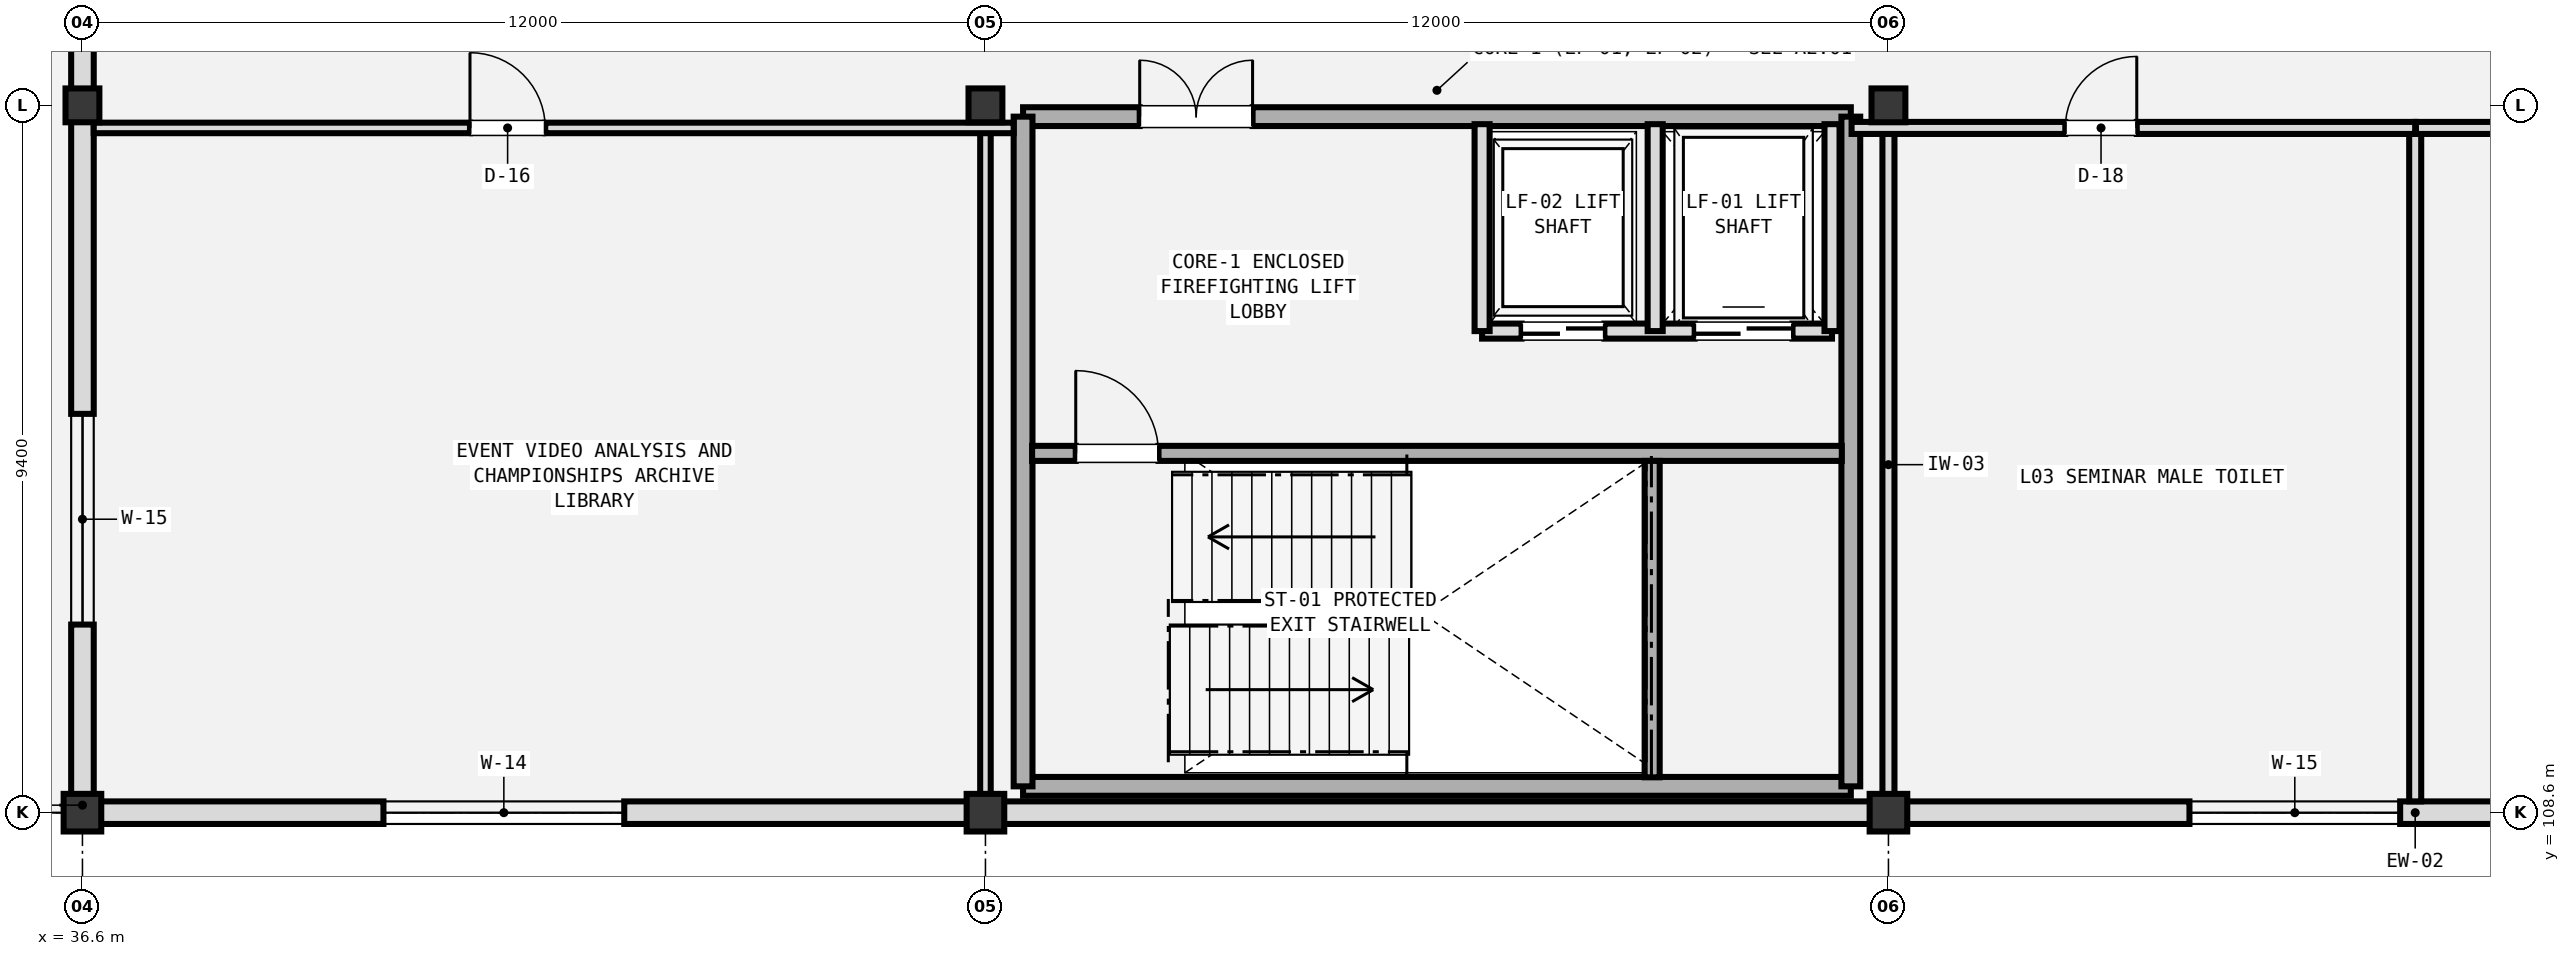
"""IFC4 building model, lengths in metres.
Left out: names, types, materials, properties, quantities, classifications, styles, units other than length and angle.
Written with IfcOpenShell. Run it as: python <this file> out.ifc"""

import sys

from ifc_helpers import new_model, si_unit, direction, frame, frame_2d, origin, origin_2d, place, context, subcontext, project, spatial, rectangle, extrude, element, fill, save


model = new_model("IFC4")
c1 = context("Model", 3, precision=1e-05, world=origin(), true_north=direction((0.0, 1.0)))
c2 = subcontext(c1, "Body", "Model", "MODEL_VIEW")
j1 = project(units=[si_unit("LENGTHUNIT", "METRE"), si_unit("PLANEANGLEUNIT", "RADIAN")], contexts=[c1])
p1 = place(None, origin())
s1 = spatial("IfcSite", under=j1, at=p1, CompositionType="ELEMENT")
p2 = place(p1, origin())
s2 = spatial("IfcBuilding", under=s1, at=p2, CompositionType="ELEMENT")
p3 = place(p2, frame((0.0, 0.0, 14.4)))
s3 = spatial("IfcBuildingStorey", under=s2, at=p3, CompositionType="ELEMENT", Elevation=14.4)
p4 = place(p3, frame((36.6, 108.6, 0.0), z_axis=(0.0, 0.0, 1.0), x_axis=(1.0, 0.0, 0.0)))
e1 = element("IfcColumn", 1, at=p4, inside=s3, PredefinedType="COLUMN", context=c2, shape_type="SweptSolid", body=[
    extrude(rectangle(XDim=0.5, YDim=0.5, at=origin_2d()), origin(), (0.0, 0.0, 1.0), 3.86),
])
p5 = place(p3, frame((36.6, 118.0, 0.0), z_axis=(0.0, 0.0, 1.0), x_axis=(1.0, 0.0, 0.0)))
e2 = element("IfcColumn", 2, at=p5, inside=s3, PredefinedType="COLUMN", context=c2, shape_type="SweptSolid", body=[
    extrude(rectangle(XDim=0.45, YDim=0.45, at=origin_2d()), origin(), (0.0, 0.0, 1.0), 3.86),
])
p6 = place(p3, frame((48.6, 108.6, 0.0), z_axis=(0.0, 0.0, 1.0), x_axis=(1.0, 0.0, 0.0)))
e3 = element("IfcColumn", 3, at=p6, inside=s3, PredefinedType="COLUMN", context=c2, shape_type="SweptSolid", body=[
    extrude(rectangle(XDim=0.5, YDim=0.5, at=origin_2d()), origin(), (0.0, 0.0, 1.0), 4.2),
])
p7 = place(p3, frame((48.6, 118.0, 0.0), z_axis=(0.0, 0.0, 1.0), x_axis=(1.0, 0.0, 0.0)))
e4 = element("IfcColumn", 4, at=p7, inside=s3, PredefinedType="COLUMN", context=c2, shape_type="SweptSolid", body=[
    extrude(rectangle(XDim=0.45, YDim=0.45, at=origin_2d()), origin(), (0.0, 0.0, 1.0), 4.2),
])
p8 = place(p3, frame((60.6, 108.6, 0.0), z_axis=(0.0, 0.0, 1.0), x_axis=(1.0, 0.0, 0.0)))
e5 = element("IfcColumn", 5, at=p8, inside=s3, PredefinedType="COLUMN", context=c2, shape_type="SweptSolid", body=[
    extrude(rectangle(XDim=0.5, YDim=0.5, at=origin_2d()), origin(), (0.0, 0.0, 1.0), 4.2),
])
p9 = place(p3, frame((60.6, 118.0, 0.0), z_axis=(0.0, 0.0, 1.0), x_axis=(1.0, 0.0, 0.0)))
e6 = element("IfcColumn", 6, at=p9, inside=s3, PredefinedType="COLUMN", context=c2, shape_type="SweptSolid", body=[
    extrude(rectangle(XDim=0.45, YDim=0.45, at=origin_2d()), origin(), (0.0, 0.0, 1.0), 4.2),
])
p10 = place(p3, frame((36.6, 108.6, 0.0), z_axis=(0.0, 0.0, 1.0), x_axis=(1.0, 0.0, 0.0)))
e7 = element("IfcWall", 7, at=p10, inside=s3, PredefinedType="SOLIDWALL", context=c2, shape_type="SweptSolid", body=[
    extrude(rectangle(XDim=62.0, YDim=0.3, at=frame_2d((31.0, 0.0))), origin(), (0.0, 0.0, 1.0), 3.51),
])
p11 = place(p10, frame((4.0, 0.0, 0.85)))
e8 = element("IfcOpeningElement", 8, at=p11, cuts=e7, PredefinedType="OPENING", context=c2, shape_type="SweptSolid", body=[
    extrude(rectangle(XDim=3.2, YDim=1.5, at=frame_2d((1.6, 0.75))), frame((0.0, 0.16, 0.0), z_axis=(0.0, -1.0, 0.0), x_axis=(1.0, 0.0, 0.0)), (0.0, 0.0, 1.0), 0.32),
])
p12 = place(p10, frame((28.0, 0.0, 0.85)))
e9 = element("IfcOpeningElement", 9, at=p12, cuts=e7, PredefinedType="OPENING", context=c2, shape_type="SweptSolid", body=[
    extrude(rectangle(XDim=2.8, YDim=1.5, at=frame_2d((1.4, 0.75))), frame((0.0, 0.16, 0.0), z_axis=(0.0, -1.0, 0.0), x_axis=(1.0, 0.0, 0.0)), (0.0, 0.0, 1.0), 0.32),
])
p13 = place(p10, frame((44.0, 0.0, 0.85)))
e10 = element("IfcOpeningElement", 10, at=p13, cuts=e7, PredefinedType="OPENING", context=c2, shape_type="SweptSolid", body=[
    extrude(rectangle(XDim=2.4, YDim=1.5, at=frame_2d((1.2, 0.75))), frame((0.0, 0.16, 0.0), z_axis=(0.0, -1.0, 0.0), x_axis=(1.0, 0.0, 0.0)), (0.0, 0.0, 1.0), 0.32),
])
p14 = place(p3, frame((36.6, 108.6, 0.0), z_axis=(0.0, 0.0, 1.0), x_axis=(0.0, 1.0, 0.0)))
e11 = element("IfcWall", 11, at=p14, inside=s3, PredefinedType="SOLIDWALL", context=c2, shape_type="SweptSolid", body=[
    extrude(rectangle(XDim=27.4, YDim=0.3, at=frame_2d((13.7, 0.0))), origin(), (0.0, 0.0, 1.0), 3.36),
])
p15 = place(p14, frame((10.2, 0.0, 0.0)))
e12 = element("IfcOpeningElement", 12, at=p15, cuts=e11, PredefinedType="OPENING", context=c2, shape_type="SweptSolid", body=[
    extrude(rectangle(XDim=1.5, YDim=2.2, at=frame_2d((0.75, 1.1))), frame((0.0, 0.16, 0.0), z_axis=(0.0, -1.0, 0.0), x_axis=(1.0, 0.0, 0.0)), (0.0, 0.0, 1.0), 0.32),
])
p16 = place(p14, frame((2.5, 0.0, 0.85)))
e13 = element("IfcOpeningElement", 13, at=p16, cuts=e11, PredefinedType="OPENING", context=c2, shape_type="SweptSolid", body=[
    extrude(rectangle(XDim=2.8, YDim=1.5, at=frame_2d((1.4, 0.75))), frame((0.0, 0.16, 0.0), z_axis=(0.0, -1.0, 0.0), x_axis=(1.0, 0.0, 0.0)), (0.0, 0.0, 1.0), 0.32),
])
p17 = place(p14, frame((16.5, 0.0, 0.85)))
e14 = element("IfcOpeningElement", 14, at=p17, cuts=e11, PredefinedType="OPENING", context=c2, shape_type="SweptSolid", body=[
    extrude(rectangle(XDim=4.0, YDim=1.5, at=frame_2d((2.0, 0.75))), frame((0.0, 0.16, 0.0), z_axis=(0.0, -1.0, 0.0), x_axis=(1.0, 0.0, 0.0)), (0.0, 0.0, 1.0), 0.32),
])
p18 = place(p3, frame((49.1, 108.95, 0.0), z_axis=(0.0, 0.0, 1.0), x_axis=(1.0, 0.0, 0.0)))
e15 = element("IfcWall", 15, at=p18, inside=s3, PredefinedType="SHEAR", context=c2, shape_type="SweptSolid", body=[
    extrude(rectangle(XDim=11.0, YDim=0.25, at=frame_2d((5.5, 0.0))), origin(), (0.0, 0.0, 1.0), 3.86),
])
p19 = place(p3, frame((49.1, 117.85, 0.0), z_axis=(0.0, 0.0, 1.0), x_axis=(1.0, 0.0, 0.0)))
e16 = element("IfcWall", 16, at=p19, inside=s3, PredefinedType="SHEAR", context=c2, shape_type="SweptSolid", body=[
    extrude(rectangle(XDim=11.0, YDim=0.25, at=frame_2d((5.5, 0.0))), origin(), (0.0, 0.0, 1.0), 3.86),
])
p20 = place(p19, frame((1.55, 0.0, 0.0)))
e17 = element("IfcOpeningElement", 17, at=p20, cuts=e16, PredefinedType="OPENING", context=c2, shape_type="SweptSolid", body=[
    extrude(rectangle(XDim=1.5, YDim=2.2, at=frame_2d((0.75, 1.1))), frame((0.0, 0.135, 0.0), z_axis=(0.0, -1.0, 0.0), x_axis=(1.0, 0.0, 0.0)), (0.0, 0.0, 1.0), 0.27),
])
for number, where, z_axis, x_axis in (
    (18, (49.1, 108.95, 0.0), (0.0, 0.0, 1.0), (0.0, 1.0, 0.0)),
    (19, (60.1, 108.95, 0.0), (0.0, 0.0, 1.0), (0.0, 1.0, 0.0)),
):
    element("IfcWall", number, at=place(p3, frame(where, z_axis=z_axis, x_axis=x_axis)), inside=s3, PredefinedType="SHEAR", context=c2, shape_type="SweptSolid", body=[
        extrude(rectangle(XDim=8.9, YDim=0.25, at=frame_2d((4.45, 0.0))), origin(), (0.0, 0.0, 1.0), 3.86),
    ])
p21 = place(p3, frame((49.22, 113.375, 0.0), z_axis=(0.0, 0.0, 1.0), x_axis=(1.0, 0.0, 0.0)))
e20 = element("IfcWall", 20, at=p21, inside=s3, PredefinedType="SHEAR", context=c2, shape_type="SweptSolid", body=[
    extrude(rectangle(XDim=10.76, YDim=0.2, at=frame_2d((5.38, 0.0))), origin(), (0.0, 0.0, 1.0), 3.86),
])
p22 = place(p21, frame((0.58, 0.0, 0.0)))
e21 = element("IfcOpeningElement", 21, at=p22, cuts=e20, PredefinedType="OPENING", context=c2, shape_type="SweptSolid", body=[
    extrude(rectangle(XDim=1.1, YDim=2.2, at=frame_2d((0.55, 1.1))), frame((0.0, 0.11, 0.0), z_axis=(0.0, -1.0, 0.0), x_axis=(1.0, 0.0, 0.0)), (0.0, 0.0, 1.0), 0.22),
])
p23 = place(p3, frame((57.46, 109.07, 0.0), z_axis=(0.0, 0.0, 1.0), x_axis=(0.0, 1.0, 0.0)))
e22 = element("IfcWall", 22, at=p23, inside=s3, PredefinedType="SHEAR", context=c2, shape_type="SweptSolid", body=[
    extrude(rectangle(XDim=4.205, YDim=0.2, at=frame_2d((2.103, 0.0))), origin(), (0.0, 0.0, 1.0), 3.86),
])
p24 = place(p3, frame((55.2, 115.0, 0.0), z_axis=(0.0, 0.0, 1.0), x_axis=(1.0, 0.0, 0.0)))
e23 = element("IfcWall", 23, at=p24, inside=s3, PredefinedType="SOLIDWALL", context=c2, shape_type="SweptSolid", body=[
    extrude(rectangle(XDim=4.65, YDim=0.2, at=frame_2d((2.325, 0.0))), origin(), (0.0, 0.0, 1.0), 3.26),
])
p25 = place(p24, frame((2.825, 0.0, 0.0)))
e24 = element("IfcOpeningElement", 24, at=p25, cuts=e23, PredefinedType="OPENING", context=c2, shape_type="SweptSolid", body=[
    extrude(rectangle(XDim=1.3, YDim=2.3, at=frame_2d((0.65, 1.15))), frame((0.0, 0.11, 0.0), z_axis=(0.0, -1.0, 0.0), x_axis=(1.0, 0.0, 0.0)), (0.0, 0.0, 1.0), 0.22),
])
p26 = place(p24, frame((0.525, 0.0, 0.0)))
e25 = element("IfcOpeningElement", 25, at=p26, cuts=e23, PredefinedType="OPENING", context=c2, shape_type="SweptSolid", body=[
    extrude(rectangle(XDim=1.1, YDim=2.2, at=frame_2d((0.55, 1.1))), frame((0.0, 0.11, 0.0), z_axis=(0.0, -1.0, 0.0), x_axis=(1.0, 0.0, 0.0)), (0.0, 0.0, 1.0), 0.22),
])
for number, where, z_axis, x_axis in (
    (26, (57.5, 115.0, 0.0), (0.0, 0.0, 1.0), (0.0, 1.0, 0.0)),
    (27, (59.85, 115.0, 0.0), (0.0, 0.0, 1.0), (0.0, 1.0, 0.0)),
    (28, (55.2, 115.0, 0.0), (0.0, 0.0, 1.0), (0.0, 1.0, 0.0)),
):
    element("IfcWall", number, at=place(p3, frame(where, z_axis=z_axis, x_axis=x_axis)), inside=s3, PredefinedType="SOLIDWALL", context=c2, shape_type="SweptSolid", body=[
        extrude(rectangle(XDim=2.75, YDim=0.2, at=frame_2d((1.375, 0.0))), origin(), (0.0, 0.0, 1.0), 3.86),
    ])
p27 = place(p3, frame((48.6, 108.75, 0.0), z_axis=(0.0, 0.0, 1.0), x_axis=(0.0, 1.0, 0.0)))
e29 = element("IfcWall", 29, at=p27, inside=s3, PredefinedType="PARTITIONING", context=c2, shape_type="SweptSolid", body=[
    extrude(rectangle(XDim=8.95, YDim=0.14, at=frame_2d((4.475, 0.0))), origin(), (0.0, 0.0, 1.0), 2.75),
])
p28 = place(p3, frame((36.75, 117.7, 0.0), z_axis=(0.0, 0.0, 1.0), x_axis=(1.0, 0.0, 0.0)))
e30 = element("IfcWall", 30, at=p28, inside=s3, PredefinedType="PARTITIONING", context=c2, shape_type="SweptSolid", body=[
    extrude(rectangle(XDim=12.225, YDim=0.14, at=frame_2d((6.113, 0.0))), origin(), (0.0, 0.0, 1.0), 2.75),
])
p29 = place(p28, frame((5.0, 0.0, 0.0)))
e31 = element("IfcOpeningElement", 31, at=p29, cuts=e30, PredefinedType="OPENING", context=c2, shape_type="SweptSolid", body=[
    extrude(rectangle(XDim=1.0, YDim=2.2, at=frame_2d((0.5, 1.1))), frame((0.0, 0.08, 0.0), z_axis=(0.0, -1.0, 0.0), x_axis=(1.0, 0.0, 0.0)), (0.0, 0.0, 1.0), 0.16),
])
for number, where, z_axis, x_axis in (
    (32, (60.6, 108.75, 0.0), (0.0, 0.0, 1.0), (0.0, 1.0, 0.0)),
    (33, (67.6, 108.75, 0.0), (0.0, 0.0, 1.0), (0.0, 1.0, 0.0)),
):
    element("IfcWall", number, at=place(p3, frame(where, z_axis=z_axis, x_axis=x_axis)), inside=s3, PredefinedType="PLUMBINGWALL", context=c2, shape_type="SweptSolid", body=[
        extrude(rectangle(XDim=8.95, YDim=0.16, at=frame_2d((4.475, 0.0))), origin(), (0.0, 0.0, 1.0), 2.75),
    ])
p30 = place(p3, frame((60.11, 117.7, 0.0), z_axis=(0.0, 0.0, 1.0), x_axis=(1.0, 0.0, 0.0)))
e34 = element("IfcWall", 34, at=p30, inside=s3, PredefinedType="PLUMBINGWALL", context=c2, shape_type="SweptSolid", body=[
    extrude(rectangle(XDim=7.49, YDim=0.16, at=frame_2d((3.745, 0.0))), origin(), (0.0, 0.0, 1.0), 2.75),
])
p31 = place(p30, frame((2.84, 0.0, 0.0)))
e35 = element("IfcOpeningElement", 35, at=p31, cuts=e34, PredefinedType="OPENING", context=c2, shape_type="SweptSolid", body=[
    extrude(rectangle(XDim=0.95, YDim=2.15, at=frame_2d((0.475, 1.075))), frame((0.0, 0.09, 0.0), z_axis=(0.0, -1.0, 0.0), x_axis=(1.0, 0.0, 0.0)), (0.0, 0.0, 1.0), 0.18),
])
p32 = place(p3, frame((67.61, 117.7, 0.0), z_axis=(0.0, 0.0, 1.0), x_axis=(1.0, 0.0, 0.0)))
e36 = element("IfcWall", 36, at=p32, inside=s3, PredefinedType="PLUMBINGWALL", context=c2, shape_type="SweptSolid", body=[
    extrude(rectangle(XDim=7.39, YDim=0.16, at=frame_2d((3.695, 0.0))), origin(), (0.0, 0.0, 1.0), 2.75),
])
p33 = place(p32, frame((2.99, 0.0, 0.0)))
e37 = element("IfcOpeningElement", 37, at=p33, cuts=e36, PredefinedType="OPENING", context=c2, shape_type="SweptSolid", body=[
    extrude(rectangle(XDim=0.95, YDim=2.15, at=frame_2d((0.475, 1.075))), frame((0.0, 0.09, 0.0), z_axis=(0.0, -1.0, 0.0), x_axis=(1.0, 0.0, 0.0)), (0.0, 0.0, 1.0), 0.18),
])
p34 = place(p11, frame((3.2, 0.0, 0.0), z_axis=(0.0, 0.0, 1.0), x_axis=(-1.0, 0.0, 0.0)))
e38 = element("IfcWindow", 38, at=p34, inside=s3, PartitioningType="DOUBLE_PANEL_HORIZONTAL", PredefinedType="WINDOW", context=c2, shape_type="SweptSolid", body=[
    extrude(rectangle(XDim=3.2, YDim=1.5, at=frame_2d((1.6, 0.75))), frame((0.0, 0.03, 0.0), z_axis=(0.0, -1.0, 0.0), x_axis=(1.0, 0.0, 0.0)), (0.0, 0.0, 1.0), 0.06),
])
fill(e8, e38)
p35 = place(p12, frame((2.8, 0.0, 0.0), z_axis=(0.0, 0.0, 1.0), x_axis=(-1.0, 0.0, 0.0)))
e39 = element("IfcWindow", 39, at=p35, inside=s3, PartitioningType="DOUBLE_PANEL_HORIZONTAL", PredefinedType="WINDOW", context=c2, shape_type="SweptSolid", body=[
    extrude(rectangle(XDim=2.8, YDim=1.5, at=frame_2d((1.4, 0.75))), frame((0.0, 0.03, 0.0), z_axis=(0.0, -1.0, 0.0), x_axis=(1.0, 0.0, 0.0)), (0.0, 0.0, 1.0), 0.06),
])
fill(e9, e39)
p36 = place(p16, origin())
e40 = element("IfcWindow", 40, at=p36, inside=s3, PartitioningType="DOUBLE_PANEL_HORIZONTAL", PredefinedType="WINDOW", context=c2, shape_type="SweptSolid", body=[
    extrude(rectangle(XDim=2.8, YDim=1.5, at=frame_2d((1.4, 0.75))), frame((0.0, 0.03, 0.0), z_axis=(0.0, -1.0, 0.0), x_axis=(1.0, 0.0, 0.0)), (0.0, 0.0, 1.0), 0.06),
])
fill(e13, e40)
p37 = place(p20, origin())
e41 = element("IfcDoor", 41, at=p37, inside=s3, OperationType="DOUBLE_DOOR_SINGLE_SWING", PredefinedType="DOOR", context=c2, shape_type="SweptSolid", body=[
    extrude(rectangle(XDim=1.5, YDim=2.2, at=frame_2d((0.75, 1.1))), frame((0.0, 0.025, 0.0), z_axis=(0.0, -1.0, 0.0), x_axis=(1.0, 0.0, 0.0)), (0.0, 0.0, 1.0), 0.05),
])
fill(e17, e41)
p38 = place(p22, origin())
e42 = element("IfcDoor", 42, at=p38, inside=s3, OperationType="SINGLE_SWING_LEFT", PredefinedType="DOOR", context=c2, shape_type="SweptSolid", body=[
    extrude(rectangle(XDim=1.1, YDim=2.2, at=frame_2d((0.55, 1.1))), frame((0.0, 0.025, 0.0), z_axis=(0.0, -1.0, 0.0), x_axis=(1.0, 0.0, 0.0)), (0.0, 0.0, 1.0), 0.05),
])
fill(e21, e42)
p39 = place(p25, frame((1.3, 0.0, 0.0), z_axis=(0.0, 0.0, 1.0), x_axis=(-1.0, 0.0, 0.0)))
e43 = element("IfcDoor", 43, at=p39, inside=s3, OperationType="DOUBLE_DOOR_SLIDING", PredefinedType="DOOR", context=c2, shape_type="SweptSolid", body=[
    extrude(rectangle(XDim=1.3, YDim=2.3, at=frame_2d((0.65, 1.15))), frame((0.0, 0.025, 0.0), z_axis=(0.0, -1.0, 0.0), x_axis=(1.0, 0.0, 0.0)), (0.0, 0.0, 1.0), 0.05),
])
fill(e24, e43)
p40 = place(p26, frame((1.1, 0.0, 0.0), z_axis=(0.0, 0.0, 1.0), x_axis=(-1.0, 0.0, 0.0)))
e44 = element("IfcDoor", 44, at=p40, inside=s3, OperationType="DOUBLE_DOOR_SLIDING", PredefinedType="DOOR", context=c2, shape_type="SweptSolid", body=[
    extrude(rectangle(XDim=1.1, YDim=2.2, at=frame_2d((0.55, 1.1))), frame((0.0, 0.025, 0.0), z_axis=(0.0, -1.0, 0.0), x_axis=(1.0, 0.0, 0.0)), (0.0, 0.0, 1.0), 0.05),
])
fill(e25, e44)
p41 = place(p29, origin())
e45 = element("IfcDoor", 45, at=p41, inside=s3, OperationType="SINGLE_SWING_LEFT", PredefinedType="DOOR", context=c2, shape_type="SweptSolid", body=[
    extrude(rectangle(XDim=1.0, YDim=2.2, at=frame_2d((0.5, 1.1))), frame((0.0, 0.025, 0.0), z_axis=(0.0, -1.0, 0.0), x_axis=(1.0, 0.0, 0.0)), (0.0, 0.0, 1.0), 0.05),
])
fill(e31, e45)
p42 = place(p31, origin())
e46 = element("IfcDoor", 46, at=p42, inside=s3, OperationType="SINGLE_SWING_RIGHT", PredefinedType="DOOR", context=c2, shape_type="SweptSolid", body=[
    extrude(rectangle(XDim=0.95, YDim=2.15, at=frame_2d((0.475, 1.075))), frame((0.0, 0.025, 0.0), z_axis=(0.0, -1.0, 0.0), x_axis=(1.0, 0.0, 0.0)), (0.0, 0.0, 1.0), 0.05),
])
fill(e35, e46)
save(model, sys.argv[1])
